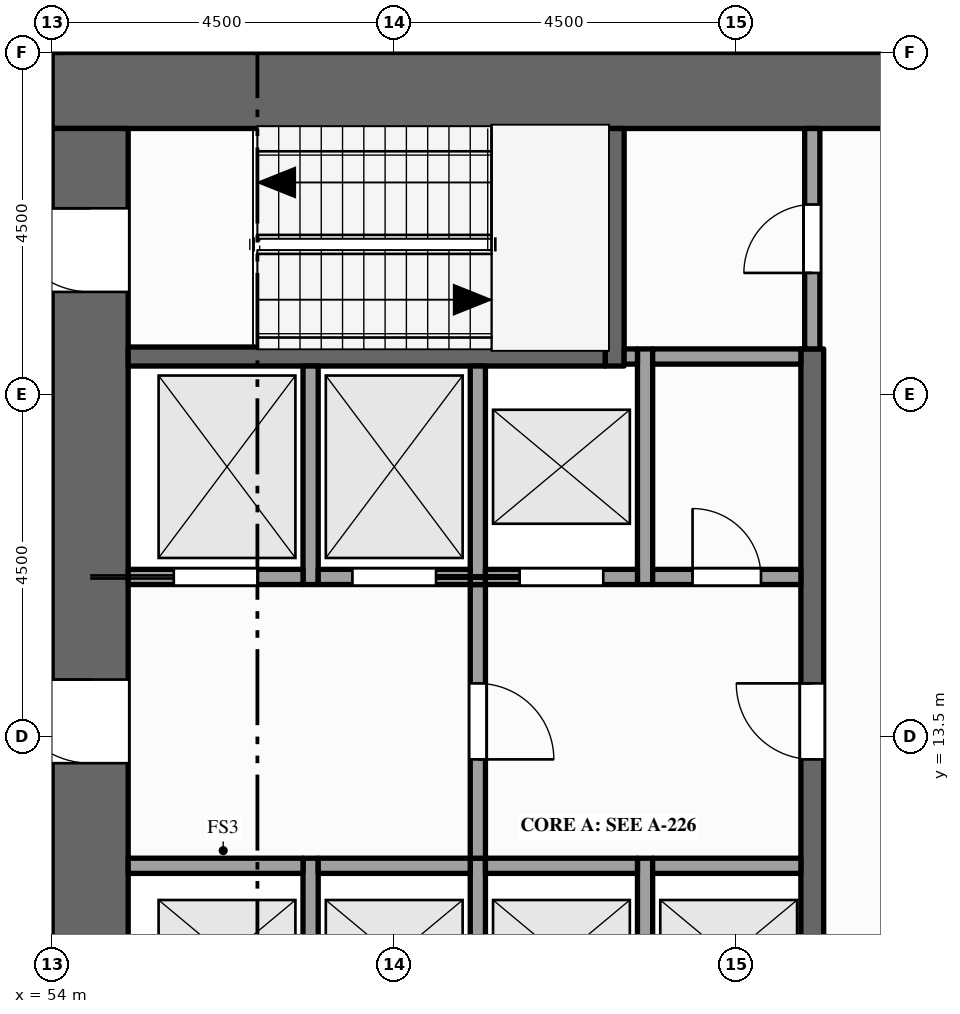
"""IFC4 building model, lengths in metres.
Left out: names, types, materials, properties, quantities, classifications, styles, units other than length and angle.
Written with IfcOpenShell. Run it as: python <this file> out.ifc"""

import sys

from ifc_helpers import new_model, si_unit, direction, frame, frame_2d, origin, place, context, subcontext, project, spatial, rectangle, extrude, element, fill, save


model = new_model("IFC4")
c1 = context("Model", 3, precision=1e-05, world=origin(), true_north=direction((0.0, 1.0)))
c2 = subcontext(c1, "Body", "Model", "MODEL_VIEW")
j1 = project(units=[si_unit("LENGTHUNIT", "METRE"), si_unit("PLANEANGLEUNIT", "RADIAN")], contexts=[c1])
p1 = place(None, origin())
s1 = spatial("IfcSite", under=j1, at=p1, CompositionType="ELEMENT")
p2 = place(p1, origin())
s2 = spatial("IfcBuilding", under=s1, at=p2, CompositionType="ELEMENT")
p3 = place(p2, frame((0.0, 0.0, 143.0)))
s3 = spatial("IfcBuildingStorey", under=s2, at=p3, CompositionType="ELEMENT", Elevation=143.0)
p4 = place(p3, frame((54.0, 22.0, -0.15), z_axis=(0.0, 0.0, 1.0), x_axis=(1.0, 0.0, 0.0)))
e1 = element("IfcWall", 1, at=p4, inside=s3, PredefinedType="SHEAR", context=c2, shape_type="SweptSolid", body=[
    extrude(rectangle(XDim=13.5, YDim=1.0, at=frame_2d((6.75, 0.0))), origin(), (0.0, 0.0, 1.0), 4.0),
])
p5 = place(p3, frame((54.5, 1.0, -0.15), z_axis=(0.0, 0.0, 1.0), x_axis=(0.0, 1.0, 0.0)))
e2 = element("IfcWall", 2, at=p5, inside=s3, PredefinedType="SHEAR", context=c2, shape_type="SweptSolid", body=[
    extrude(rectangle(XDim=20.5, YDim=1.0, at=frame_2d((10.25, 0.0))), origin(), (0.0, 0.0, 1.0), 4.0),
])
p6 = place(p5, frame((6.1, 0.0, 0.15)))
e3 = element("IfcOpeningElement", 3, at=p6, cuts=e2, PredefinedType="OPENING", context=c2, shape_type="SweptSolid", body=[
    extrude(rectangle(XDim=1.8, YDim=2.1, at=frame_2d((0.9, 1.05))), frame((0.0, 0.51, 0.0), z_axis=(0.0, -1.0, 0.0), x_axis=(1.0, 0.0, 0.0)), (0.0, 0.0, 1.0), 1.02),
])
p7 = place(p5, frame((12.15, 0.0, 0.15)))
e4 = element("IfcOpeningElement", 4, at=p7, cuts=e2, PredefinedType="OPENING", context=c2, shape_type="SweptSolid", body=[
    extrude(rectangle(XDim=1.1, YDim=2.1, at=frame_2d((0.55, 1.05))), frame((0.0, 0.51, 0.0), z_axis=(0.0, -1.0, 0.0), x_axis=(1.0, 0.0, 0.0)), (0.0, 0.0, 1.0), 1.02),
])
p8 = place(p5, frame((1.15, 0.0, 0.15)))
e5 = element("IfcOpeningElement", 5, at=p8, cuts=e2, PredefinedType="OPENING", context=c2, shape_type="SweptSolid", body=[
    extrude(rectangle(XDim=1.1, YDim=2.1, at=frame_2d((0.55, 1.05))), frame((0.0, 0.51, 0.0), z_axis=(0.0, -1.0, 0.0), x_axis=(1.0, 0.0, 0.0)), (0.0, 0.0, 1.0), 1.02),
])
p9 = place(p5, frame((18.35, 0.0, 0.15)))
e6 = element("IfcOpeningElement", 6, at=p9, cuts=e2, PredefinedType="OPENING", context=c2, shape_type="SweptSolid", body=[
    extrude(rectangle(XDim=1.1, YDim=2.1, at=frame_2d((0.55, 1.05))), frame((0.0, 0.51, 0.0), z_axis=(0.0, -1.0, 0.0), x_axis=(1.0, 0.0, 0.0)), (0.0, 0.0, 1.0), 1.02),
])
p10 = place(p3, frame((54.0, 22.5, 0.0), z_axis=(0.0, 0.0, 1.0), x_axis=(0.0, 1.0, 0.0)))
e7 = element("IfcWall", 7, at=p10, inside=s3, PredefinedType="STANDARD", context=c2, shape_type="SweptSolid", body=[
    extrude(rectangle(XDim=1.05, YDim=0.3, at=frame_2d((0.525, 0.0))), origin(), (0.0, 0.0, 1.0), 3.149),
])
p11 = place(p3, frame((57.4, 9.3, 0.0), z_axis=(0.0, 0.0, 1.0), x_axis=(0.0, 1.0, 0.0)))
e8 = element("IfcWall", 8, at=p11, inside=s3, PredefinedType="SOLIDWALL", context=c2, shape_type="SweptSolid", body=[
    extrude(rectangle(XDim=2.6, YDim=0.2, at=frame_2d((1.3, 0.0))), origin(), (0.0, 0.0, 1.0), 3.85),
])
p12 = place(p3, frame((57.4, 15.5, 0.0), z_axis=(0.0, 0.0, 1.0), x_axis=(0.0, 1.0, 0.0)))
e9 = element("IfcWall", 9, at=p12, inside=s3, PredefinedType="SOLIDWALL", context=c2, shape_type="SweptSolid", body=[
    extrude(rectangle(XDim=2.875, YDim=0.2, at=frame_2d((1.438, 0.0))), origin(), (0.0, 0.0, 1.0), 3.85),
])
p13 = place(p3, frame((59.6, 9.3, 0.0), z_axis=(0.0, 0.0, 1.0), x_axis=(0.0, 1.0, 0.0)))
e10 = element("IfcWall", 10, at=p13, inside=s3, PredefinedType="SOLIDWALL", context=c2, shape_type="SweptSolid", body=[
    extrude(rectangle(XDim=2.6, YDim=0.2, at=frame_2d((1.3, 0.0))), origin(), (0.0, 0.0, 1.0), 3.85),
])
p14 = place(p3, frame((59.6, 11.9, 0.0), z_axis=(0.0, 0.0, 1.0), x_axis=(0.0, 1.0, 0.0)))
e11 = element("IfcWall", 11, at=p14, inside=s3, PredefinedType="PARTITIONING", context=c2, shape_type="SweptSolid", body=[
    extrude(rectangle(XDim=3.6, YDim=0.2, at=frame_2d((1.8, 0.0))), origin(), (0.0, 0.0, 1.0), 3.85),
])
p15 = place(p14, frame((1.3, 0.0, 0.0)))
e12 = element("IfcOpeningElement", 12, at=p15, cuts=e11, PredefinedType="OPENING", context=c2, shape_type="SweptSolid", body=[
    extrude(rectangle(XDim=1.0, YDim=2.1, at=frame_2d((0.5, 1.05))), frame((0.0, 0.11, 0.0), z_axis=(0.0, -1.0, 0.0), x_axis=(1.0, 0.0, 0.0)), (0.0, 0.0, 1.0), 0.22),
])
p16 = place(p3, frame((59.6, 15.5, 0.0), z_axis=(0.0, 0.0, 1.0), x_axis=(0.0, 1.0, 0.0)))
e13 = element("IfcWall", 13, at=p16, inside=s3, PredefinedType="SOLIDWALL", context=c2, shape_type="SweptSolid", body=[
    extrude(rectangle(XDim=2.875, YDim=0.2, at=frame_2d((1.438, 0.0))), origin(), (0.0, 0.0, 1.0), 3.85),
])
p17 = place(p3, frame((61.4, 18.375, 0.0), z_axis=(0.0, 0.0, 1.0), x_axis=(0.0, 1.0, 0.0)))
e14 = element("IfcWall", 14, at=p17, inside=s3, PredefinedType="SHEAR", context=c2, shape_type="SweptSolid", body=[
    extrude(rectangle(XDim=3.125, YDim=0.25, at=frame_2d((1.562, 0.0))), origin(), (0.0, 0.0, 1.0), 3.85),
])
p18 = place(p3, frame((61.8, 9.3, 0.0), z_axis=(0.0, 0.0, 1.0), x_axis=(0.0, 1.0, 0.0)))
e15 = element("IfcWall", 15, at=p18, inside=s3, PredefinedType="SOLIDWALL", context=c2, shape_type="SweptSolid", body=[
    extrude(rectangle(XDim=2.6, YDim=0.2, at=frame_2d((1.3, 0.0))), origin(), (0.0, 0.0, 1.0), 3.85),
])
p19 = place(p3, frame((61.8, 15.5, 0.0), z_axis=(0.0, 0.0, 1.0), x_axis=(0.0, 1.0, 0.0)))
e16 = element("IfcWall", 16, at=p19, inside=s3, PredefinedType="SOLIDWALL", context=c2, shape_type="SweptSolid", body=[
    extrude(rectangle(XDim=3.1, YDim=0.2, at=frame_2d((1.55, 0.0))), origin(), (0.0, 0.0, 1.0), 3.85),
])
p20 = place(p3, frame((64.0, 4.1, 0.0), z_axis=(0.0, 0.0, 1.0), x_axis=(0.0, 1.0, 0.0)))
e17 = element("IfcWall", 17, at=p20, inside=s3, PredefinedType="SHEAR", context=c2, shape_type="SweptSolid", body=[
    extrude(rectangle(XDim=14.5, YDim=0.3, at=frame_2d((7.25, 0.0))), origin(), (0.0, 0.0, 1.0), 3.85),
])
p21 = place(p20, frame((3.4, 0.0, 0.0)))
e18 = element("IfcOpeningElement", 18, at=p21, cuts=e17, PredefinedType="OPENING", context=c2, shape_type="SweptSolid", body=[
    extrude(rectangle(XDim=1.0, YDim=2.1, at=frame_2d((0.5, 1.05))), frame((0.0, 0.16, 0.0), z_axis=(0.0, -1.0, 0.0), x_axis=(1.0, 0.0, 0.0)), (0.0, 0.0, 1.0), 0.32),
])
p22 = place(p20, frame((9.1, 0.0, 0.0)))
e19 = element("IfcOpeningElement", 19, at=p22, cuts=e17, PredefinedType="OPENING", context=c2, shape_type="SweptSolid", body=[
    extrude(rectangle(XDim=1.0, YDim=2.1, at=frame_2d((0.5, 1.05))), frame((0.0, 0.16, 0.0), z_axis=(0.0, -1.0, 0.0), x_axis=(1.0, 0.0, 0.0)), (0.0, 0.0, 1.0), 0.32),
])
p23 = place(p3, frame((64.0, 18.6, 0.0), z_axis=(0.0, 0.0, 1.0), x_axis=(0.0, 1.0, 0.0)))
e20 = element("IfcWall", 20, at=p23, inside=s3, PredefinedType="PARTITIONING", context=c2, shape_type="SweptSolid", body=[
    extrude(rectangle(XDim=2.9, YDim=0.2, at=frame_2d((1.45, 0.0))), origin(), (0.0, 0.0, 1.0), 3.85),
])
p24 = place(p23, frame((1.0, 0.0, 0.0)))
e21 = element("IfcOpeningElement", 21, at=p24, cuts=e20, PredefinedType="OPENING", context=c2, shape_type="SweptSolid", body=[
    extrude(rectangle(XDim=0.9, YDim=2.1, at=frame_2d((0.45, 1.05))), frame((0.0, 0.11, 0.0), z_axis=(0.0, -1.0, 0.0), x_axis=(1.0, 0.0, 0.0)), (0.0, 0.0, 1.0), 0.22),
])
p25 = place(p3, frame((55.0, 11.8, 0.0), z_axis=(0.0, 0.0, 1.0), x_axis=(1.0, 0.0, 0.0)))
e22 = element("IfcWall", 22, at=p25, inside=s3, PredefinedType="SOLIDWALL", context=c2, shape_type="SweptSolid", body=[
    extrude(rectangle(XDim=2.3, YDim=0.2, at=frame_2d((1.15, 0.0))), origin(), (0.0, 0.0, 1.0), 3.85),
])
for number, where, z_axis, x_axis in (
    (23, (57.5, 11.8, 0.0), (0.0, 0.0, 1.0), (1.0, 0.0, 0.0)),
    (24, (59.7, 11.8, 0.0), (0.0, 0.0, 1.0), (1.0, 0.0, 0.0)),
):
    element("IfcWall", number, at=place(p3, frame(where, z_axis=z_axis, x_axis=x_axis)), inside=s3, PredefinedType="SOLIDWALL", context=c2, shape_type="SweptSolid", body=[
        extrude(rectangle(XDim=2.0, YDim=0.2, at=frame_2d((1.0, 0.0))), origin(), (0.0, 0.0, 1.0), 3.85),
    ])
p26 = place(p3, frame((61.9, 11.8, 0.0), z_axis=(0.0, 0.0, 1.0), x_axis=(1.0, 0.0, 0.0)))
e25 = element("IfcWall", 25, at=p26, inside=s3, PredefinedType="SOLIDWALL", context=c2, shape_type="SweptSolid", body=[
    extrude(rectangle(XDim=1.95, YDim=0.2, at=frame_2d((0.975, 0.0))), origin(), (0.0, 0.0, 1.0), 3.85),
])
p27 = place(p3, frame((55.0, 15.6, 0.0), z_axis=(0.0, 0.0, 1.0), x_axis=(1.0, 0.0, 0.0)))
e26 = element("IfcWall", 26, at=p27, inside=s3, PredefinedType="SOLIDWALL", context=c2, shape_type="SweptSolid", body=[
    extrude(rectangle(XDim=2.3, YDim=0.2, at=frame_2d((1.15, 0.0))), origin(), (0.0, 0.0, 1.0), 3.85),
])
p28 = place(p27, frame((0.6, 0.0, 0.012)))
e27 = element("IfcOpeningElement", 27, at=p28, cuts=e26, PredefinedType="OPENING", context=c2, shape_type="SweptSolid", body=[
    extrude(rectangle(XDim=1.1, YDim=2.1, at=frame_2d((0.55, 1.05))), frame((0.0, 0.11, 0.0), z_axis=(0.0, -1.0, 0.0), x_axis=(1.0, 0.0, 0.0)), (0.0, 0.0, 1.0), 0.22),
])
p29 = place(p3, frame((57.5, 15.6, 0.0), z_axis=(0.0, 0.0, 1.0), x_axis=(1.0, 0.0, 0.0)))
e28 = element("IfcWall", 28, at=p29, inside=s3, PredefinedType="SOLIDWALL", context=c2, shape_type="SweptSolid", body=[
    extrude(rectangle(XDim=2.0, YDim=0.2, at=frame_2d((1.0, 0.0))), origin(), (0.0, 0.0, 1.0), 3.85),
])
p30 = place(p29, frame((0.45, 0.0, 0.012)))
e29 = element("IfcOpeningElement", 29, at=p30, cuts=e28, PredefinedType="OPENING", context=c2, shape_type="SweptSolid", body=[
    extrude(rectangle(XDim=1.1, YDim=2.1, at=frame_2d((0.55, 1.05))), frame((0.0, 0.11, 0.0), z_axis=(0.0, -1.0, 0.0), x_axis=(1.0, 0.0, 0.0)), (0.0, 0.0, 1.0), 0.22),
])
p31 = place(p3, frame((59.7, 15.6, 0.0), z_axis=(0.0, 0.0, 1.0), x_axis=(1.0, 0.0, 0.0)))
e30 = element("IfcWall", 30, at=p31, inside=s3, PredefinedType="SOLIDWALL", context=c2, shape_type="SweptSolid", body=[
    extrude(rectangle(XDim=2.0, YDim=0.2, at=frame_2d((1.0, 0.0))), origin(), (0.0, 0.0, 1.0), 3.85),
])
p32 = place(p31, frame((0.45, 0.0, 0.012)))
e31 = element("IfcOpeningElement", 31, at=p32, cuts=e30, PredefinedType="OPENING", context=c2, shape_type="SweptSolid", body=[
    extrude(rectangle(XDim=1.1, YDim=2.1, at=frame_2d((0.55, 1.05))), frame((0.0, 0.11, 0.0), z_axis=(0.0, -1.0, 0.0), x_axis=(1.0, 0.0, 0.0)), (0.0, 0.0, 1.0), 0.22),
])
p33 = place(p3, frame((61.9, 15.6, 0.0), z_axis=(0.0, 0.0, 1.0), x_axis=(1.0, 0.0, 0.0)))
e32 = element("IfcWall", 32, at=p33, inside=s3, PredefinedType="PARTITIONING", context=c2, shape_type="SweptSolid", body=[
    extrude(rectangle(XDim=1.95, YDim=0.2, at=frame_2d((0.975, 0.0))), origin(), (0.0, 0.0, 1.0), 3.85),
])
p34 = place(p33, frame((0.525, 0.0, 0.0)))
e33 = element("IfcOpeningElement", 33, at=p34, cuts=e32, PredefinedType="OPENING", context=c2, shape_type="SweptSolid", body=[
    extrude(rectangle(XDim=0.9, YDim=2.1, at=frame_2d((0.45, 1.05))), frame((0.0, 0.11, 0.0), z_axis=(0.0, -1.0, 0.0), x_axis=(1.0, 0.0, 0.0)), (0.0, 0.0, 1.0), 0.22),
])
p35 = place(p3, frame((55.0, 18.5, 0.0), z_axis=(0.0, 0.0, 1.0), x_axis=(1.0, 0.0, 0.0)))
e34 = element("IfcWall", 34, at=p35, inside=s3, PredefinedType="SHEAR", context=c2, shape_type="SweptSolid", body=[
    extrude(rectangle(XDim=6.275, YDim=0.25, at=frame_2d((3.137, 0.0))), origin(), (0.0, 0.0, 1.0), 3.85),
])
p36 = place(p3, frame((61.525, 18.5, 0.0), z_axis=(0.0, 0.0, 1.0), x_axis=(1.0, 0.0, 0.0)))
e35 = element("IfcWall", 35, at=p36, inside=s3, PredefinedType="SOLIDWALL", context=c2, shape_type="SweptSolid", body=[
    extrude(rectangle(XDim=0.175, YDim=0.2, at=frame_2d((0.087, 0.0))), origin(), (0.0, 0.0, 1.0), 3.85),
])
p37 = place(p3, frame((61.9, 18.5, 0.0), z_axis=(0.0, 0.0, 1.0), x_axis=(1.0, 0.0, 0.0)))
e36 = element("IfcWall", 36, at=p37, inside=s3, PredefinedType="PARTITIONING", context=c2, shape_type="SweptSolid", body=[
    extrude(rectangle(XDim=1.95, YDim=0.2, at=frame_2d((0.975, 0.0))), origin(), (0.0, 0.0, 1.0), 3.85),
])
p38 = place(p28, origin())
e37 = element("IfcDoor", 37, at=p38, inside=s3, OperationType="SLIDING_TO_LEFT", PredefinedType="DOOR", context=c2, shape_type="SweptSolid", body=[
    extrude(rectangle(XDim=1.1, YDim=2.1, at=frame_2d((0.55, 1.05))), frame((0.0, 0.025, 0.0), z_axis=(0.0, -1.0, 0.0), x_axis=(1.0, 0.0, 0.0)), (0.0, 0.0, 1.0), 0.05),
])
fill(e27, e37)
p39 = place(p30, origin())
e38 = element("IfcDoor", 38, at=p39, inside=s3, OperationType="SLIDING_TO_RIGHT", PredefinedType="DOOR", context=c2, shape_type="SweptSolid", body=[
    extrude(rectangle(XDim=1.1, YDim=2.1, at=frame_2d((0.55, 1.05))), frame((0.0, 0.025, 0.0), z_axis=(0.0, -1.0, 0.0), x_axis=(1.0, 0.0, 0.0)), (0.0, 0.0, 1.0), 0.05),
])
fill(e29, e38)
p40 = place(p32, origin())
e39 = element("IfcDoor", 39, at=p40, inside=s3, OperationType="SLIDING_TO_LEFT", PredefinedType="DOOR", context=c2, shape_type="SweptSolid", body=[
    extrude(rectangle(XDim=1.1, YDim=2.1, at=frame_2d((0.55, 1.05))), frame((0.0, 0.025, 0.0), z_axis=(0.0, -1.0, 0.0), x_axis=(1.0, 0.0, 0.0)), (0.0, 0.0, 1.0), 0.05),
])
fill(e31, e39)
p41 = place(p7, origin())
e40 = element("IfcDoor", 40, at=p41, inside=s3, OperationType="SINGLE_SWING_RIGHT", PredefinedType="DOOR", context=c2, shape_type="SweptSolid", body=[
    extrude(rectangle(XDim=1.1, YDim=2.1, at=frame_2d((0.55, 1.05))), frame((0.0, 0.025, 0.0), z_axis=(0.0, -1.0, 0.0), x_axis=(1.0, 0.0, 0.0)), (0.0, 0.0, 1.0), 0.05),
])
fill(e4, e40)
p42 = place(p15, origin())
e41 = element("IfcDoor", 41, at=p42, inside=s3, OperationType="SINGLE_SWING_LEFT", PredefinedType="DOOR", context=c2, shape_type="SweptSolid", body=[
    extrude(rectangle(XDim=1.0, YDim=2.1, at=frame_2d((0.5, 1.05))), frame((0.0, 0.025, 0.0), z_axis=(0.0, -1.0, 0.0), x_axis=(1.0, 0.0, 0.0)), (0.0, 0.0, 1.0), 0.05),
])
fill(e12, e41)
p43 = place(p22, origin())
e42 = element("IfcDoor", 42, at=p43, inside=s3, OperationType="SINGLE_SWING_RIGHT", PredefinedType="DOOR", context=c2, shape_type="SweptSolid", body=[
    extrude(rectangle(XDim=1.0, YDim=2.1, at=frame_2d((0.5, 1.05))), frame((0.0, 0.025, 0.0), z_axis=(0.0, -1.0, 0.0), x_axis=(1.0, 0.0, 0.0)), (0.0, 0.0, 1.0), 0.05),
])
fill(e19, e42)
p44 = place(p9, origin())
e43 = element("IfcDoor", 43, at=p44, inside=s3, OperationType="SINGLE_SWING_RIGHT", PredefinedType="DOOR", context=c2, shape_type="SweptSolid", body=[
    extrude(rectangle(XDim=1.1, YDim=2.1, at=frame_2d((0.55, 1.05))), frame((0.0, 0.025, 0.0), z_axis=(0.0, -1.0, 0.0), x_axis=(1.0, 0.0, 0.0)), (0.0, 0.0, 1.0), 0.05),
])
fill(e6, e43)
p45 = place(p24, origin())
e44 = element("IfcDoor", 44, at=p45, inside=s3, OperationType="SINGLE_SWING_LEFT", PredefinedType="DOOR", context=c2, shape_type="SweptSolid", body=[
    extrude(rectangle(XDim=0.9, YDim=2.1, at=frame_2d((0.45, 1.05))), frame((0.0, 0.025, 0.0), z_axis=(0.0, -1.0, 0.0), x_axis=(1.0, 0.0, 0.0)), (0.0, 0.0, 1.0), 0.05),
])
fill(e21, e44)
p46 = place(p34, origin())
e45 = element("IfcDoor", 45, at=p46, inside=s3, OperationType="SINGLE_SWING_LEFT", PredefinedType="DOOR", context=c2, shape_type="SweptSolid", body=[
    extrude(rectangle(XDim=0.9, YDim=2.1, at=frame_2d((0.45, 1.05))), frame((0.0, 0.025, 0.0), z_axis=(0.0, -1.0, 0.0), x_axis=(1.0, 0.0, 0.0)), (0.0, 0.0, 1.0), 0.05),
])
fill(e33, e45)
save(model, sys.argv[1])
